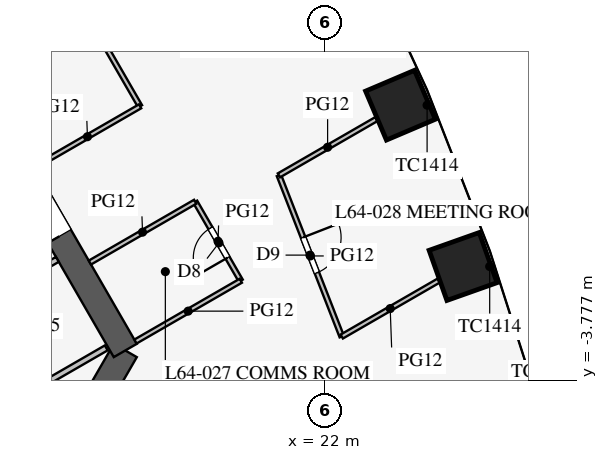
"""IFC4 building model, lengths in metres.
Left out: names, types, materials, properties, quantities, classifications, styles, units other than length and angle.
Written with IfcOpenShell. Run it as: python <this file> out.ifc"""

import sys

from ifc_helpers import new_model, si_unit, direction, frame, frame_2d, origin, origin_2d, place, context, subcontext, project, spatial, rectangle, extrude, element, fill, save


model = new_model("IFC4")
c1 = context("Model", 3, precision=1e-05, world=origin(), true_north=direction((0.0, 1.0)))
c2 = subcontext(c1, "Body", "Model", "MODEL_VIEW")
j1 = project(units=[si_unit("LENGTHUNIT", "METRE"), si_unit("PLANEANGLEUNIT", "RADIAN")], contexts=[c1])
p1 = place(None, origin())
s1 = spatial("IfcSite", under=j1, at=p1, CompositionType="ELEMENT")
p2 = place(p1, origin())
s2 = spatial("IfcBuilding", under=s1, at=p2, CompositionType="ELEMENT")
p3 = place(p2, frame((0.0, 0.0, 280.5)))
s3 = spatial("IfcBuildingStorey", under=s2, at=p3, CompositionType="ELEMENT", Elevation=280.5)
for number, where, z_axis, x_axis in (
    (1, (25.632, -0.79, 0.0), (0.0, 0.0, 1.0), (-0.334, 0.942, 0.0)),
    (2, (23.985, 3.455, 0.0), (0.0, 0.0, 1.0), (-0.391, 0.92, 0.0)),
):
    element("IfcColumn", number, at=place(p3, frame(where, z_axis=z_axis, x_axis=x_axis)), inside=s3, PredefinedType="COLUMN", context=c2, shape_type="SweptSolid", body=[
        extrude(rectangle(XDim=1.4, YDim=1.4, at=origin_2d()), origin(), (0.0, 0.0, 1.0), 4.2),
    ])
p4 = place(p3, frame((10.97, -13.0, 0.0), z_axis=(0.0, 0.0, 1.0), x_axis=(0.499995765644, 0.866027848477, 0.0)))
e3 = element("IfcWall", 3, at=p4, inside=s3, PredefinedType="SHEAR", context=c2, shape_type="SweptSolid", body=[
    extrude(rectangle(XDim=11.547, YDim=0.7, at=frame_2d((5.773, 0.0))), origin(), (0.0, 0.0, 1.0), 4.2),
])
p5 = place(p3, frame((16.743, -3.0, 0.0), z_axis=(0.0, 0.0, 1.0), x_axis=(-0.500002442456, 0.866023993627, 0.0)))
e4 = element("IfcWall", 4, at=p5, inside=s3, PredefinedType="SHEAR", context=c2, shape_type="SweptSolid", body=[
    extrude(rectangle(XDim=21.939, YDim=0.7, at=frame_2d((10.97, 0.0))), origin(), (0.0, 0.0, 1.0), 4.2),
])
p6 = place(p5, frame((17.27, 0.0, 0.0)))
e5 = element("IfcOpeningElement", 5, at=p6, cuts=e4, PredefinedType="OPENING", context=c2, shape_type="SweptSolid", body=[
    extrude(rectangle(XDim=1.2, YDim=2.1, at=frame_2d((0.6, 1.05))), frame((0.0, 0.36, 0.0), z_axis=(0.0, -1.0, 0.0), x_axis=(1.0, 0.0, 0.0)), (0.0, 0.0, 1.0), 0.72),
])
p7 = place(p5, frame((3.47, 0.0, 0.0)))
e6 = element("IfcOpeningElement", 6, at=p7, cuts=e4, PredefinedType="OPENING", context=c2, shape_type="SweptSolid", body=[
    extrude(rectangle(XDim=1.2, YDim=2.1, at=frame_2d((0.6, 1.05))), frame((0.0, 0.36, 0.0), z_axis=(0.0, -1.0, 0.0), x_axis=(1.0, 0.0, 0.0)), (0.0, 0.0, 1.0), 0.72),
])
p8 = place(p3, frame((10.495, -3.178, 0.0), z_axis=(0.0, 0.0, 1.0), x_axis=(0.866037967349, 0.499978238636, 0.0)))
e7 = element("IfcWall", 7, at=p8, inside=s3, PredefinedType="PARTITIONING", context=c2, shape_type="SweptSolid", body=[
    extrude(rectangle(XDim=5.15, YDim=0.15, at=frame_2d((2.575, 0.0))), origin(), (0.0, 0.0, 1.0), 4.0),
])
p9 = place(p8, frame((2.6, 0.0, 0.0)))
e8 = element("IfcOpeningElement", 8, at=p9, cuts=e7, PredefinedType="OPENING", context=c2, shape_type="SweptSolid", body=[
    extrude(rectangle(XDim=0.9, YDim=2.1, at=frame_2d((0.45, 1.05))), frame((0.0, 0.085, 0.0), z_axis=(0.0, -1.0, 0.0), x_axis=(1.0, 0.0, 0.0)), (0.0, 0.0, 1.0), 0.17),
])
p10 = place(p3, frame((12.691, -4.982, 0.0), z_axis=(0.0, 0.0, 1.0), x_axis=(0.8660249478, 0.500000789788, 0.0)))
e9 = element("IfcWall", 9, at=p10, inside=s3, PredefinedType="PARTITIONING", context=c2, shape_type="SweptSolid", body=[
    extrude(rectangle(XDim=4.1, YDim=0.15, at=frame_2d((2.05, 0.0))), origin(), (0.0, 0.0, 1.0), 4.0),
])
p11 = place(p3, frame((19.783, -1.165, 0.0), z_axis=(0.0, 0.0, 1.0), x_axis=(-0.499957262057, 0.866050077142, 0.0)))
e10 = element("IfcWall", 10, at=p11, inside=s3, PredefinedType="PARTITIONING", context=c2, shape_type="SweptSolid", body=[
    extrude(rectangle(XDim=2.4, YDim=0.12, at=frame_2d((1.2, 0.0))), origin(), (0.0, 0.0, 1.0), 2.9),
])
p12 = place(p11, frame((0.7, 0.0, 0.15)))
e11 = element("IfcOpeningElement", 11, at=p12, cuts=e10, PredefinedType="OPENING", context=c2, shape_type="SweptSolid", body=[
    extrude(rectangle(XDim=0.9, YDim=2.1, at=frame_2d((0.45, 1.05))), frame((0.0, 0.07, 0.0), z_axis=(0.0, -1.0, 0.0), x_axis=(1.0, 0.0, 0.0)), (0.0, 0.0, 1.0), 0.14),
])
p13 = place(p3, frame((17.133, 3.425, 0.0), z_axis=(0.0, 0.0, 1.0), x_axis=(-0.500016814911, 0.866015695474, 0.0)))
e12 = element("IfcWall", 12, at=p13, inside=s3, PredefinedType="PARTITIONING", context=c2, shape_type="SweptSolid", body=[
    extrude(rectangle(XDim=5.6, YDim=0.12, at=frame_2d((2.8, 0.0))), origin(), (0.0, 0.0, 1.0), 2.9),
])
p14 = place(p13, frame((2.3, 0.0, 0.15)))
e13 = element("IfcOpeningElement", 13, at=p14, cuts=e12, PredefinedType="OPENING", context=c2, shape_type="SweptSolid", body=[
    extrude(rectangle(XDim=1.0, YDim=2.1, at=frame_2d((0.5, 1.05))), frame((0.0, 0.07, 0.0), z_axis=(0.0, -1.0, 0.0), x_axis=(1.0, 0.0, 0.0)), (0.0, 0.0, 1.0), 0.14),
])
p15 = place(p3, frame((17.011, -2.765, 0.0), z_axis=(0.0, 0.0, 1.0), x_axis=(0.866042017984, 0.499971222258, 0.0)))
e14 = element("IfcWall", 14, at=p15, inside=s3, PredefinedType="PARTITIONING", context=c2, shape_type="SweptSolid", body=[
    extrude(rectangle(XDim=3.2, YDim=0.12, at=frame_2d((1.6, 0.0))), origin(), (0.0, 0.0, 1.0), 2.9),
])
p16 = place(p3, frame((14.361, 1.825, 0.0), z_axis=(0.0, 0.0, 1.0), x_axis=(0.866028054938, 0.499995408039, 0.0)))
e15 = element("IfcWall", 15, at=p16, inside=s3, PredefinedType="PARTITIONING", context=c2, shape_type="SweptSolid", body=[
    extrude(rectangle(XDim=3.2, YDim=0.12, at=frame_2d((1.6, 0.0))), origin(), (0.0, 0.0, 1.0), 2.9),
])
p17 = place(p3, frame((15.812, -0.686, 0.0), z_axis=(0.0, 0.0, 1.0), x_axis=(0.866008981251, 0.500028443584, 0.0)))
e16 = element("IfcWall", 16, at=p17, inside=s3, PredefinedType="PARTITIONING", context=c2, shape_type="SweptSolid", body=[
    extrude(rectangle(XDim=3.2, YDim=0.12, at=frame_2d((1.6, 0.0))), origin(), (0.0, 0.0, 1.0), 2.9),
])
p18 = place(p3, frame((22.439, -2.633, 0.0), z_axis=(0.0, 0.0, 1.0), x_axis=(-0.363212149153, 0.931706463811, 0.0)))
e17 = element("IfcWall", 17, at=p18, inside=s3, PredefinedType="PARTITIONING", context=c2, shape_type="SweptSolid", body=[
    extrude(rectangle(XDim=4.553, YDim=0.12, at=frame_2d((2.276, 0.0))), origin(), (0.0, 0.0, 1.0), 2.9),
])
p19 = place(p18, frame((1.8, 0.0, 0.15)))
e18 = element("IfcOpeningElement", 18, at=p19, cuts=e17, PredefinedType="OPENING", context=c2, shape_type="SweptSolid", body=[
    extrude(rectangle(XDim=1.0, YDim=2.1, at=frame_2d((0.5, 1.05))), frame((0.0, 0.07, 0.0), z_axis=(0.0, -1.0, 0.0), x_axis=(1.0, 0.0, 0.0)), (0.0, 0.0, 1.0), 0.14),
])
p20 = place(p3, frame((22.439, -2.633, 0.0), z_axis=(0.0, 0.0, 1.0), x_axis=(0.866019881867, 0.500009564119, 0.0)))
e19 = element("IfcWall", 19, at=p20, inside=s3, PredefinedType="PARTITIONING", context=c2, shape_type="SweptSolid", body=[
    extrude(rectangle(XDim=2.944, YDim=0.12, at=frame_2d((1.472, 0.0))), origin(), (0.0, 0.0, 1.0), 2.8),
])
p21 = place(p3, frame((20.786, 1.608, 0.0), z_axis=(0.0, 0.0, 1.0), x_axis=(0.866056430242, 0.499946256749, 0.0)))
e20 = element("IfcWall", 20, at=p21, inside=s3, PredefinedType="PARTITIONING", context=c2, shape_type="SweptSolid", body=[
    extrude(rectangle(XDim=2.959, YDim=0.12, at=frame_2d((1.479, 0.0))), origin(), (0.0, 0.0, 1.0), 2.9),
])
p22 = place(p7, origin())
e21 = element("IfcDoor", 21, at=p22, inside=s3, OperationType="SINGLE_SWING_LEFT", PredefinedType="DOOR", context=c2, shape_type="SweptSolid", body=[
    extrude(rectangle(XDim=1.2, YDim=2.1, at=frame_2d((0.6, 1.05))), frame((0.0, 0.025, 0.0), z_axis=(0.0, -1.0, 0.0), x_axis=(1.0, 0.0, 0.0)), (0.0, 0.0, 1.0), 0.05),
])
fill(e6, e21)
p23 = place(p12, origin())
e22 = element("IfcDoor", 22, at=p23, inside=s3, OperationType="SINGLE_SWING_LEFT", PredefinedType="DOOR", context=c2, shape_type="SweptSolid", body=[
    extrude(rectangle(XDim=0.9, YDim=2.1, at=frame_2d((0.45, 1.05))), frame((0.0, 0.025, 0.0), z_axis=(0.0, -1.0, 0.0), x_axis=(1.0, 0.0, 0.0)), (0.0, 0.0, 1.0), 0.05),
])
fill(e11, e22)
p24 = place(p19, frame((1.0, 0.0, 0.0), z_axis=(0.0, 0.0, 1.0), x_axis=(-1.0, 0.0, 0.0)))
e23 = element("IfcDoor", 23, at=p24, inside=s3, OperationType="SINGLE_SWING_LEFT", PredefinedType="DOOR", context=c2, shape_type="SweptSolid", body=[
    extrude(rectangle(XDim=1.0, YDim=2.1, at=frame_2d((0.5, 1.05))), frame((0.0, 0.025, 0.0), z_axis=(0.0, -1.0, 0.0), x_axis=(1.0, 0.0, 0.0)), (0.0, 0.0, 1.0), 0.05),
])
fill(e18, e23)
save(model, sys.argv[1])
